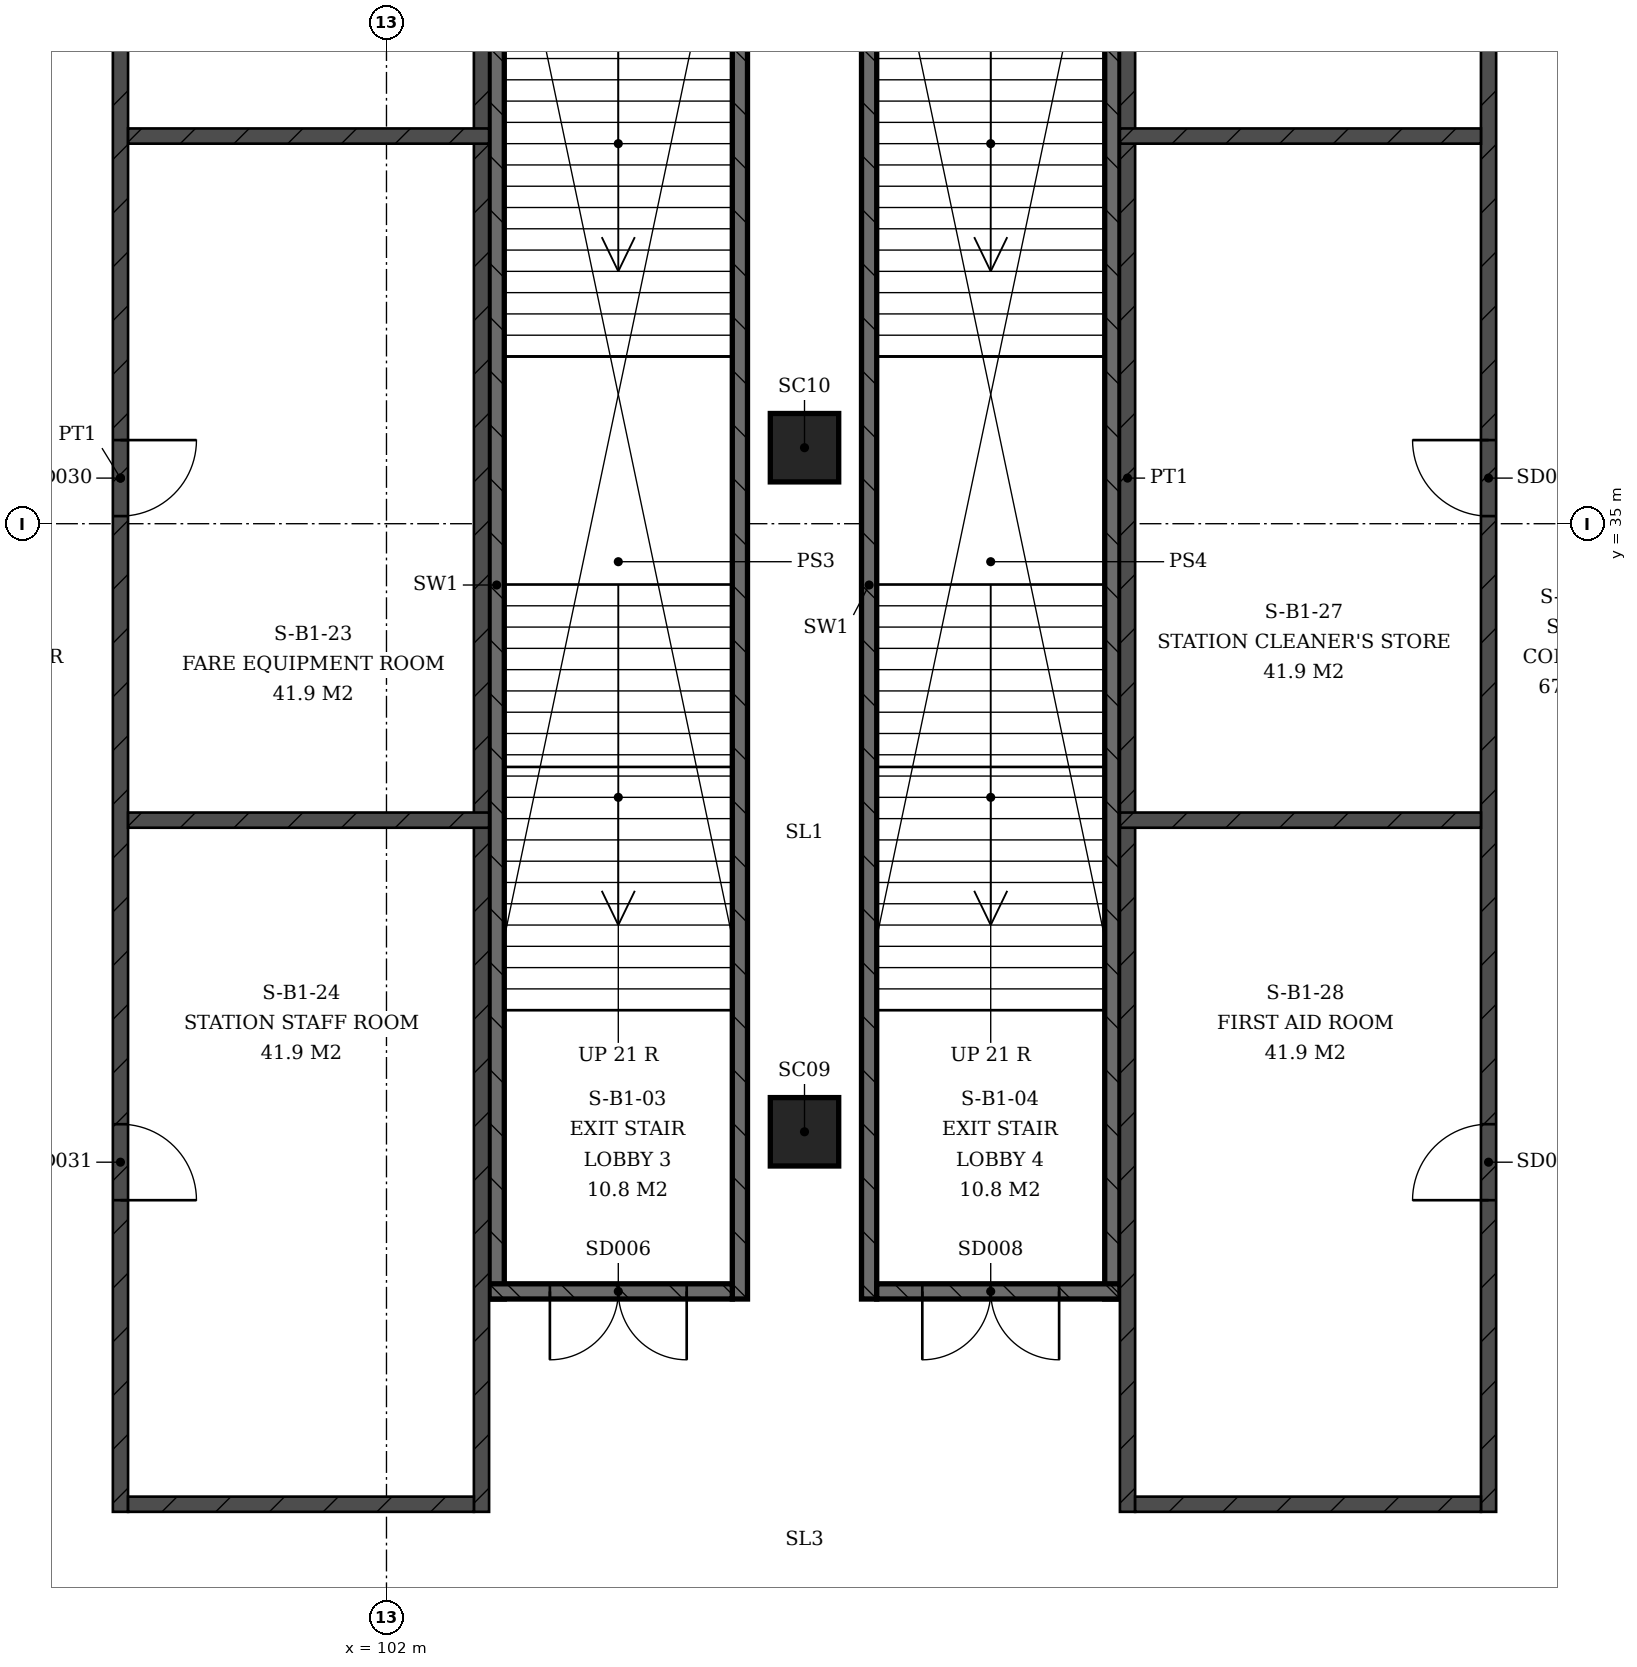
"""IFC4 building model, lengths in metres.
Left out: names, types, materials, properties, quantities, classifications, styles, units other than length and angle.
Written with IfcOpenShell. Run it as: python <this file> out.ifc"""

import sys

from ifc_helpers import new_model, si_unit, direction, frame, frame_2d, origin, origin_2d, place, context, subcontext, project, spatial, rectangle, extrude, element, fill, save


model = new_model("IFC4")
c1 = context("Model", 3, precision=1e-05, world=origin(), true_north=direction((0.0, 1.0)))
c2 = subcontext(c1, "Body", "Model", "MODEL_VIEW")
j1 = project(units=[si_unit("LENGTHUNIT", "METRE"), si_unit("PLANEANGLEUNIT", "RADIAN")], contexts=[c1])
p1 = place(None, origin())
s1 = spatial("IfcSite", under=j1, at=p1, CompositionType="ELEMENT")
p2 = place(p1, origin())
s2 = spatial("IfcBuilding", under=s1, at=p2, CompositionType="ELEMENT")
p3 = place(p2, frame((0.0, 0.0, -4.5)))
s3 = spatial("IfcBuildingStorey", under=s2, at=p3, CompositionType="ELEMENT", Elevation=-4.5)
for number, where, z_axis, x_axis in (
    (1, (103.45, 24.8, 0.0), (0.0, 0.0, 1.0), (0.0, 1.0, 0.0)),
    (2, (106.65, 24.8, 0.0), (0.0, 0.0, 1.0), (0.0, 1.0, 0.0)),
):
    element("IfcWall", number, at=place(p3, frame(where, z_axis=z_axis, x_axis=x_axis)), inside=s3, PredefinedType="SHEAR", context=c2, shape_type="SweptSolid", body=[
        extrude(rectangle(XDim=20.0, YDim=0.2, at=frame_2d((10.0, 0.0))), origin(), (0.0, 0.0, 1.0), 3.5),
    ])
p4 = place(p3, frame((103.35, 24.9, 0.0), z_axis=(0.0, 0.0, 1.0), x_axis=(1.0, 0.0, 0.0)))
e3 = element("IfcWall", 3, at=p4, inside=s3, PredefinedType="SHEAR", context=c2, shape_type="SweptSolid", body=[
    extrude(rectangle(XDim=3.2, YDim=0.2, at=frame_2d((1.6, 0.0))), origin(), (0.0, 0.0, 1.0), 3.5),
])
p5 = place(p4, frame((0.8, 0.0, 0.0)))
e4 = element("IfcOpeningElement", 4, at=p5, cuts=e3, PredefinedType="OPENING", context=c2, shape_type="SweptSolid", body=[
    extrude(rectangle(XDim=1.8, YDim=2.1, at=frame_2d((0.9, 1.05))), frame((0.0, 0.1, 0.0), z_axis=(0.0, -1.0, 0.0), x_axis=(1.0, 0.0, 0.0)), (0.0, 0.0, 1.0), 0.2),
])
for number, where, z_axis, x_axis in (
    (5, (108.35, 24.8, 0.0), (0.0, 0.0, 1.0), (0.0, 1.0, 0.0)),
    (6, (111.55, 24.8, 0.0), (0.0, 0.0, 1.0), (0.0, 1.0, 0.0)),
):
    element("IfcWall", number, at=place(p3, frame(where, z_axis=z_axis, x_axis=x_axis)), inside=s3, PredefinedType="SHEAR", context=c2, shape_type="SweptSolid", body=[
        extrude(rectangle(XDim=20.0, YDim=0.2, at=frame_2d((10.0, 0.0))), origin(), (0.0, 0.0, 1.0), 3.5),
    ])
p6 = place(p3, frame((108.45, 24.9, 0.0), z_axis=(0.0, 0.0, 1.0), x_axis=(1.0, 0.0, 0.0)))
e7 = element("IfcWall", 7, at=p6, inside=s3, PredefinedType="SHEAR", context=c2, shape_type="SweptSolid", body=[
    extrude(rectangle(XDim=3.2, YDim=0.2, at=frame_2d((1.6, 0.0))), origin(), (0.0, 0.0, 1.0), 3.5),
])
p7 = place(p6, frame((0.6, 0.0, 0.0)))
e8 = element("IfcOpeningElement", 8, at=p7, cuts=e7, PredefinedType="OPENING", context=c2, shape_type="SweptSolid", body=[
    extrude(rectangle(XDim=1.8, YDim=2.1, at=frame_2d((0.9, 1.05))), frame((0.0, 0.1, 0.0), z_axis=(0.0, -1.0, 0.0), x_axis=(1.0, 0.0, 0.0)), (0.0, 0.0, 1.0), 0.2),
])
for number, where, z_axis, x_axis in (
    (9, (107.5, 27.0, 0.0), (0.0, 0.0, 1.0), (1.0, 0.0, 0.0)),
    (10, (107.5, 36.0, 0.0), (0.0, 0.0, 1.0), (1.0, 0.0, 0.0)),
):
    element("IfcColumn", number, at=place(p3, frame(where, z_axis=z_axis, x_axis=x_axis)), inside=s3, PredefinedType="COLUMN", context=c2, shape_type="SweptSolid", body=[
        extrude(rectangle(XDim=0.9, YDim=0.9, at=origin_2d()), origin(), (0.0, 0.0, 1.0), 3.5),
    ])
p8 = place(p3, frame((98.5, 22.0, 0.0), z_axis=(0.0, 0.0, 1.0), x_axis=(0.0, 1.0, 0.0)))
e11 = element("IfcWall", 11, at=p8, inside=s3, PredefinedType="PARTITIONING", context=c2, shape_type="SweptSolid", body=[
    extrude(rectangle(XDim=27.1, YDim=0.2, at=frame_2d((13.55, 0.0))), origin(), (0.0, 0.0, 1.0), 3.5),
])
p9 = place(p8, frame((22.05, 0.0, 0.0)))
e12 = element("IfcOpeningElement", 12, at=p9, cuts=e11, PredefinedType="OPENING", context=c2, shape_type="SweptSolid", body=[
    extrude(rectangle(XDim=1.0, YDim=2.1, at=frame_2d((0.5, 1.05))), frame((0.0, 0.1, 0.0), z_axis=(0.0, -1.0, 0.0), x_axis=(1.0, 0.0, 0.0)), (0.0, 0.0, 1.0), 0.2),
])
p10 = place(p8, frame((13.1, 0.0, 0.0)))
e13 = element("IfcOpeningElement", 13, at=p10, cuts=e11, PredefinedType="OPENING", context=c2, shape_type="SweptSolid", body=[
    extrude(rectangle(XDim=1.0, YDim=2.1, at=frame_2d((0.5, 1.05))), frame((0.0, 0.1, 0.0), z_axis=(0.0, -1.0, 0.0), x_axis=(1.0, 0.0, 0.0)), (0.0, 0.0, 1.0), 0.2),
])
p11 = place(p8, frame((4.1, 0.0, 0.0)))
e14 = element("IfcOpeningElement", 14, at=p11, cuts=e11, PredefinedType="OPENING", context=c2, shape_type="SweptSolid", body=[
    extrude(rectangle(XDim=1.0, YDim=2.1, at=frame_2d((0.5, 1.05))), frame((0.0, 0.1, 0.0), z_axis=(0.0, -1.0, 0.0), x_axis=(1.0, 0.0, 0.0)), (0.0, 0.0, 1.0), 0.2),
])
p12 = place(p3, frame((103.25, 22.0, 0.0), z_axis=(0.0, 0.0, 1.0), x_axis=(0.0, 1.0, 0.0)))
e15 = element("IfcWall", 15, at=p12, inside=s3, PredefinedType="PARTITIONING", context=c2, shape_type="SweptSolid", body=[
    extrude(rectangle(XDim=27.1, YDim=0.2, at=frame_2d((13.55, 0.0))), origin(), (0.0, 0.0, 1.0), 3.5),
])
for number, where, z_axis, x_axis in (
    (16, (98.6, 40.1, 0.0), (0.0, 0.0, 1.0), (1.0, 0.0, 0.0)),
    (17, (98.6, 31.1, 0.0), (0.0, 0.0, 1.0), (1.0, 0.0, 0.0)),
):
    element("IfcWall", number, at=place(p3, frame(where, z_axis=z_axis, x_axis=x_axis)), inside=s3, PredefinedType="PARTITIONING", context=c2, shape_type="SweptSolid", body=[
        extrude(rectangle(XDim=4.75, YDim=0.2, at=frame_2d((2.375, 0.0))), origin(), (0.0, 0.0, 1.0), 3.5),
    ])
p13 = place(p3, frame((98.6, 22.1, 0.0), z_axis=(0.0, 0.0, 1.0), x_axis=(1.0, 0.0, 0.0)))
e18 = element("IfcWall", 18, at=p13, inside=s3, PredefinedType="PARTITIONING", context=c2, shape_type="SweptSolid", body=[
    extrude(rectangle(XDim=4.55, YDim=0.2, at=frame_2d((2.275, 0.0))), origin(), (0.0, 0.0, 1.0), 3.5),
])
p14 = place(p3, frame((116.5, 22.0, 0.0), z_axis=(0.0, 0.0, 1.0), x_axis=(0.0, 1.0, 0.0)))
e19 = element("IfcWall", 19, at=p14, inside=s3, PredefinedType="PARTITIONING", context=c2, shape_type="SweptSolid", body=[
    extrude(rectangle(XDim=27.1, YDim=0.2, at=frame_2d((13.55, 0.0))), origin(), (0.0, 0.0, 1.0), 3.5),
])
p15 = place(p14, frame((22.05, 0.0, 0.0)))
e20 = element("IfcOpeningElement", 20, at=p15, cuts=e19, PredefinedType="OPENING", context=c2, shape_type="SweptSolid", body=[
    extrude(rectangle(XDim=1.0, YDim=2.1, at=frame_2d((0.5, 1.05))), frame((0.0, 0.1, 0.0), z_axis=(0.0, -1.0, 0.0), x_axis=(1.0, 0.0, 0.0)), (0.0, 0.0, 1.0), 0.2),
])
p16 = place(p14, frame((13.1, 0.0, 0.0)))
e21 = element("IfcOpeningElement", 21, at=p16, cuts=e19, PredefinedType="OPENING", context=c2, shape_type="SweptSolid", body=[
    extrude(rectangle(XDim=1.0, YDim=2.1, at=frame_2d((0.5, 1.05))), frame((0.0, 0.1, 0.0), z_axis=(0.0, -1.0, 0.0), x_axis=(1.0, 0.0, 0.0)), (0.0, 0.0, 1.0), 0.2),
])
p17 = place(p14, frame((4.1, 0.0, 0.0)))
e22 = element("IfcOpeningElement", 22, at=p17, cuts=e19, PredefinedType="OPENING", context=c2, shape_type="SweptSolid", body=[
    extrude(rectangle(XDim=1.0, YDim=2.1, at=frame_2d((0.5, 1.05))), frame((0.0, 0.1, 0.0), z_axis=(0.0, -1.0, 0.0), x_axis=(1.0, 0.0, 0.0)), (0.0, 0.0, 1.0), 0.2),
])
p18 = place(p3, frame((111.75, 22.0, 0.0), z_axis=(0.0, 0.0, 1.0), x_axis=(0.0, 1.0, 0.0)))
e23 = element("IfcWall", 23, at=p18, inside=s3, PredefinedType="PARTITIONING", context=c2, shape_type="SweptSolid", body=[
    extrude(rectangle(XDim=27.1, YDim=0.2, at=frame_2d((13.55, 0.0))), origin(), (0.0, 0.0, 1.0), 3.5),
])
for number, where, z_axis, x_axis in (
    (24, (111.65, 40.1, 0.0), (0.0, 0.0, 1.0), (1.0, 0.0, 0.0)),
    (25, (111.65, 31.1, 0.0), (0.0, 0.0, 1.0), (1.0, 0.0, 0.0)),
):
    element("IfcWall", number, at=place(p3, frame(where, z_axis=z_axis, x_axis=x_axis)), inside=s3, PredefinedType="PARTITIONING", context=c2, shape_type="SweptSolid", body=[
        extrude(rectangle(XDim=4.75, YDim=0.2, at=frame_2d((2.375, 0.0))), origin(), (0.0, 0.0, 1.0), 3.5),
    ])
p19 = place(p3, frame((111.85, 22.1, 0.0), z_axis=(0.0, 0.0, 1.0), x_axis=(1.0, 0.0, 0.0)))
e26 = element("IfcWall", 26, at=p19, inside=s3, PredefinedType="PARTITIONING", context=c2, shape_type="SweptSolid", body=[
    extrude(rectangle(XDim=4.55, YDim=0.2, at=frame_2d((2.275, 0.0))), origin(), (0.0, 0.0, 1.0), 3.5),
])
p20 = place(p5, origin())
e27 = element("IfcDoor", 27, at=p20, inside=s3, OperationType="DOUBLE_DOOR_SINGLE_SWING", PredefinedType="DOOR", context=c2, shape_type="SweptSolid", body=[
    extrude(rectangle(XDim=1.8, YDim=2.1, at=frame_2d((0.9, 1.05))), frame((0.0, 0.025, 0.0), z_axis=(0.0, -1.0, 0.0), x_axis=(1.0, 0.0, 0.0)), (0.0, 0.0, 1.0), 0.05),
])
fill(e4, e27)
p21 = place(p7, origin())
e28 = element("IfcDoor", 28, at=p21, inside=s3, OperationType="DOUBLE_DOOR_SINGLE_SWING", PredefinedType="DOOR", context=c2, shape_type="SweptSolid", body=[
    extrude(rectangle(XDim=1.8, YDim=2.1, at=frame_2d((0.9, 1.05))), frame((0.0, 0.025, 0.0), z_axis=(0.0, -1.0, 0.0), x_axis=(1.0, 0.0, 0.0)), (0.0, 0.0, 1.0), 0.05),
])
fill(e8, e28)
p22 = place(p10, origin())
e29 = element("IfcDoor", 29, at=p22, inside=s3, OperationType="SINGLE_SWING_RIGHT", PredefinedType="DOOR", context=c2, shape_type="SweptSolid", body=[
    extrude(rectangle(XDim=1.0, YDim=2.1, at=frame_2d((0.5, 1.05))), frame((0.0, 0.025, 0.0), z_axis=(0.0, -1.0, 0.0), x_axis=(1.0, 0.0, 0.0)), (0.0, 0.0, 1.0), 0.05),
])
fill(e13, e29)
p23 = place(p11, origin())
e30 = element("IfcDoor", 30, at=p23, inside=s3, OperationType="SINGLE_SWING_LEFT", PredefinedType="DOOR", context=c2, shape_type="SweptSolid", body=[
    extrude(rectangle(XDim=1.0, YDim=2.1, at=frame_2d((0.5, 1.05))), frame((0.0, 0.025, 0.0), z_axis=(0.0, -1.0, 0.0), x_axis=(1.0, 0.0, 0.0)), (0.0, 0.0, 1.0), 0.05),
])
fill(e14, e30)
p24 = place(p16, origin())
e31 = element("IfcDoor", 31, at=p24, inside=s3, OperationType="SINGLE_SWING_LEFT", PredefinedType="DOOR", context=c2, shape_type="SweptSolid", body=[
    extrude(rectangle(XDim=1.0, YDim=2.1, at=frame_2d((0.5, 1.05))), frame((0.0, 0.025, 0.0), z_axis=(0.0, -1.0, 0.0), x_axis=(1.0, 0.0, 0.0)), (0.0, 0.0, 1.0), 0.05),
])
fill(e21, e31)
p25 = place(p17, origin())
e32 = element("IfcDoor", 32, at=p25, inside=s3, OperationType="SINGLE_SWING_RIGHT", PredefinedType="DOOR", context=c2, shape_type="SweptSolid", body=[
    extrude(rectangle(XDim=1.0, YDim=2.1, at=frame_2d((0.5, 1.05))), frame((0.0, 0.025, 0.0), z_axis=(0.0, -1.0, 0.0), x_axis=(1.0, 0.0, 0.0)), (0.0, 0.0, 1.0), 0.05),
])
fill(e22, e32)
save(model, sys.argv[1])
